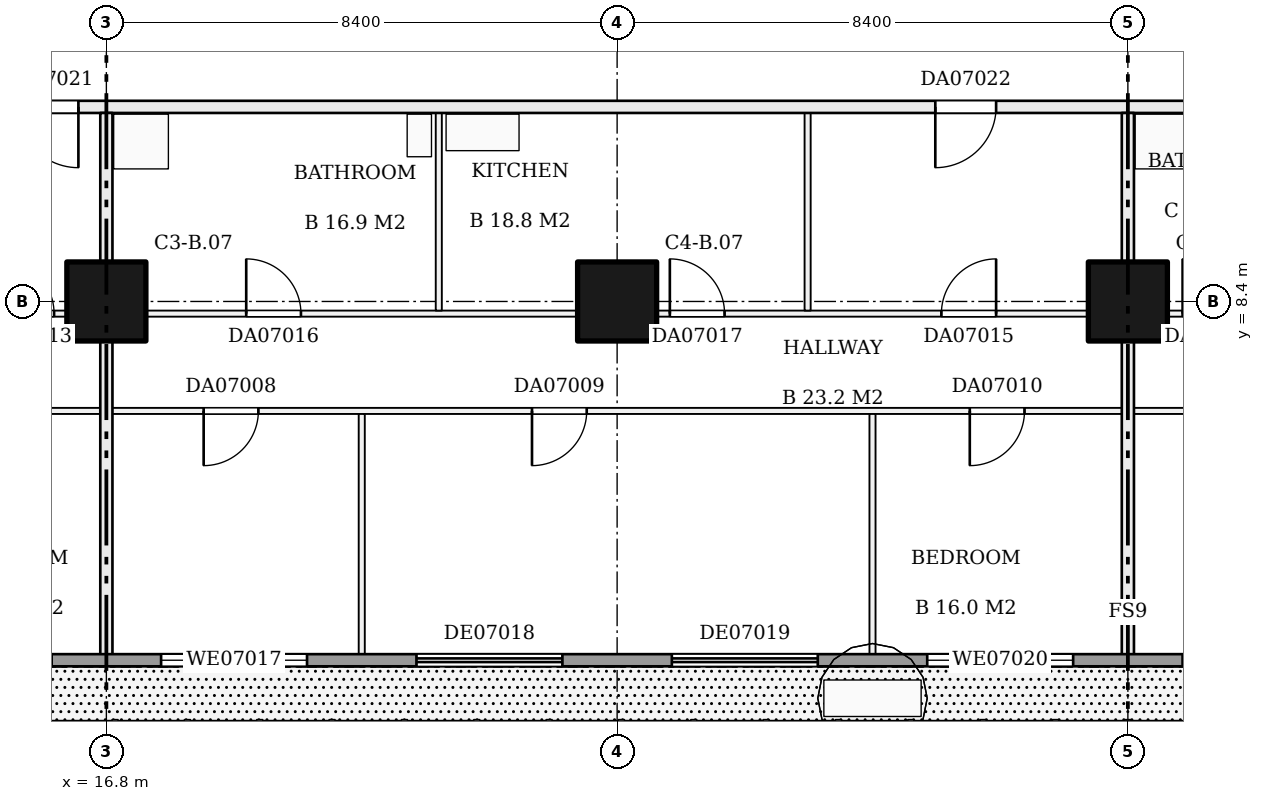
"""IFC4 building model, lengths in metres.
Left out: names, types, materials, properties, quantities, classifications, styles, units other than length and angle.
Written with IfcOpenShell. Run it as: python <this file> out.ifc"""

import sys

from ifc_helpers import new_model, si_unit, direction, frame, frame_2d, origin, origin_2d, place, context, subcontext, project, spatial, rectangle, extrude, element, fill, save


model = new_model("IFC4")
c1 = context("Model", 3, precision=1e-05, world=origin(), true_north=direction((0.0, 1.0)))
c2 = subcontext(c1, "Body", "Model", "MODEL_VIEW")
j1 = project(units=[si_unit("LENGTHUNIT", "METRE"), si_unit("PLANEANGLEUNIT", "RADIAN")], contexts=[c1])
p1 = place(None, origin())
s1 = spatial("IfcSite", under=j1, at=p1, CompositionType="ELEMENT")
p2 = place(p1, origin())
s2 = spatial("IfcBuilding", under=s1, at=p2, CompositionType="ELEMENT")
p3 = place(p2, frame((0.0, 0.0, 35.7)))
s3 = spatial("IfcBuildingStorey", under=s2, at=p3, CompositionType="ELEMENT", Elevation=35.7)
for number, where, z_axis, x_axis in (
    (1, (16.8, 8.4, 0.0), (0.0, 0.0, 1.0), (1.0, 0.0, 0.0)),
    (2, (25.2, 8.4, 0.0), (0.0, 0.0, 1.0), (1.0, 0.0, 0.0)),
    (3, (33.6, 8.4, 0.0), (0.0, 0.0, 1.0), (1.0, 0.0, 0.0)),
):
    element("IfcColumn", number, at=place(p3, frame(where, z_axis=z_axis, x_axis=x_axis)), inside=s3, PredefinedType="COLUMN", context=c2, shape_type="SweptSolid", body=[
        extrude(rectangle(XDim=1.3, YDim=1.3, at=origin_2d()), origin(), (0.0, 0.0, 1.0), 3.22),
    ])
p4 = place(p3, frame((12.65, 6.6, 0.0), z_axis=(0.0, 0.0, 1.0), x_axis=(1.0, 0.0, 0.0)))
e4 = element("IfcWall", 4, at=p4, inside=s3, PredefinedType="PARTITIONING", context=c2, shape_type="SweptSolid", body=[
    extrude(rectangle(XDim=29.25, YDim=0.1, at=frame_2d((14.625, 0.0))), origin(), (0.0, 0.0, 1.0), 3.22),
])
p5 = place(p4, frame((1.65, 0.0, 0.0)))
e5 = element("IfcOpeningElement", 5, at=p5, cuts=e4, PredefinedType="OPENING", context=c2, shape_type="SweptSolid", body=[
    extrude(rectangle(XDim=0.9, YDim=2.1, at=frame_2d((0.45, 1.05))), frame((0.0, 0.06, 0.0), z_axis=(0.0, -1.0, 0.0), x_axis=(1.0, 0.0, 0.0)), (0.0, 0.0, 1.0), 0.12),
])
p6 = place(p4, frame((5.75, 0.0, 0.0)))
e6 = element("IfcOpeningElement", 6, at=p6, cuts=e4, PredefinedType="OPENING", context=c2, shape_type="SweptSolid", body=[
    extrude(rectangle(XDim=0.9, YDim=2.1, at=frame_2d((0.45, 1.05))), frame((0.0, 0.06, 0.0), z_axis=(0.0, -1.0, 0.0), x_axis=(1.0, 0.0, 0.0)), (0.0, 0.0, 1.0), 0.12),
])
p7 = place(p4, frame((11.15, 0.0, 0.0)))
e7 = element("IfcOpeningElement", 7, at=p7, cuts=e4, PredefinedType="OPENING", context=c2, shape_type="SweptSolid", body=[
    extrude(rectangle(XDim=0.9, YDim=2.1, at=frame_2d((0.45, 1.05))), frame((0.0, 0.06, 0.0), z_axis=(0.0, -1.0, 0.0), x_axis=(1.0, 0.0, 0.0)), (0.0, 0.0, 1.0), 0.12),
])
p8 = place(p4, frame((18.35, 0.0, 0.0)))
e8 = element("IfcOpeningElement", 8, at=p8, cuts=e4, PredefinedType="OPENING", context=c2, shape_type="SweptSolid", body=[
    extrude(rectangle(XDim=0.9, YDim=2.1, at=frame_2d((0.45, 1.05))), frame((0.0, 0.06, 0.0), z_axis=(0.0, -1.0, 0.0), x_axis=(1.0, 0.0, 0.0)), (0.0, 0.0, 1.0), 0.12),
])
p9 = place(p4, frame((22.55, 0.0, 0.0)))
e9 = element("IfcOpeningElement", 9, at=p9, cuts=e4, PredefinedType="OPENING", context=c2, shape_type="SweptSolid", body=[
    extrude(rectangle(XDim=0.9, YDim=2.1, at=frame_2d((0.45, 1.05))), frame((0.0, 0.06, 0.0), z_axis=(0.0, -1.0, 0.0), x_axis=(1.0, 0.0, 0.0)), (0.0, 0.0, 1.0), 0.12),
])
p10 = place(p4, frame((26.75, 0.0, 0.0)))
e10 = element("IfcOpeningElement", 10, at=p10, cuts=e4, PredefinedType="OPENING", context=c2, shape_type="SweptSolid", body=[
    extrude(rectangle(XDim=0.9, YDim=2.1, at=frame_2d((0.45, 1.05))), frame((0.0, 0.06, 0.0), z_axis=(0.0, -1.0, 0.0), x_axis=(1.0, 0.0, 0.0)), (0.0, 0.0, 1.0), 0.12),
])
p11 = place(p3, frame((12.65, 8.2, 0.0), z_axis=(0.0, 0.0, 1.0), x_axis=(1.0, 0.0, 0.0)))
e11 = element("IfcWall", 11, at=p11, inside=s3, PredefinedType="PARTITIONING", context=c2, shape_type="SweptSolid", body=[
    extrude(rectangle(XDim=29.25, YDim=0.1, at=frame_2d((14.625, 0.0))), origin(), (0.0, 0.0, 1.0), 3.22),
])
p12 = place(p11, frame((2.39, 0.0, 0.0)))
e12 = element("IfcOpeningElement", 12, at=p12, cuts=e11, PredefinedType="OPENING", context=c2, shape_type="SweptSolid", body=[
    extrude(rectangle(XDim=0.9, YDim=2.1, at=frame_2d((0.45, 1.05))), frame((0.0, 0.06, 0.0), z_axis=(0.0, -1.0, 0.0), x_axis=(1.0, 0.0, 0.0)), (0.0, 0.0, 1.0), 0.12),
])
p13 = place(p11, frame((0.65, 0.0, 0.0)))
e13 = element("IfcOpeningElement", 13, at=p13, cuts=e11, PredefinedType="OPENING", context=c2, shape_type="SweptSolid", body=[
    extrude(rectangle(XDim=0.9, YDim=2.1, at=frame_2d((0.45, 1.05))), frame((0.0, 0.06, 0.0), z_axis=(0.0, -1.0, 0.0), x_axis=(1.0, 0.0, 0.0)), (0.0, 0.0, 1.0), 0.12),
])
p14 = place(p11, frame((17.883, 0.0, 0.0)))
e14 = element("IfcOpeningElement", 14, at=p14, cuts=e11, PredefinedType="OPENING", context=c2, shape_type="SweptSolid", body=[
    extrude(rectangle(XDim=0.9, YDim=2.1, at=frame_2d((0.45, 1.05))), frame((0.0, 0.06, 0.0), z_axis=(0.0, -1.0, 0.0), x_axis=(1.0, 0.0, 0.0)), (0.0, 0.0, 1.0), 0.12),
])
p15 = place(p11, frame((6.45, 0.0, 0.0)))
e15 = element("IfcOpeningElement", 15, at=p15, cuts=e11, PredefinedType="OPENING", context=c2, shape_type="SweptSolid", body=[
    extrude(rectangle(XDim=0.9, YDim=2.1, at=frame_2d((0.45, 1.05))), frame((0.0, 0.06, 0.0), z_axis=(0.0, -1.0, 0.0), x_axis=(1.0, 0.0, 0.0)), (0.0, 0.0, 1.0), 0.12),
])
p16 = place(p11, frame((13.417, 0.0, 0.0)))
e16 = element("IfcOpeningElement", 16, at=p16, cuts=e11, PredefinedType="OPENING", context=c2, shape_type="SweptSolid", body=[
    extrude(rectangle(XDim=0.9, YDim=2.1, at=frame_2d((0.45, 1.05))), frame((0.0, 0.06, 0.0), z_axis=(0.0, -1.0, 0.0), x_axis=(1.0, 0.0, 0.0)), (0.0, 0.0, 1.0), 0.12),
])
p17 = place(p11, frame((27.683, 0.0, 0.0)))
e17 = element("IfcOpeningElement", 17, at=p17, cuts=e11, PredefinedType="OPENING", context=c2, shape_type="SweptSolid", body=[
    extrude(rectangle(XDim=0.9, YDim=2.1, at=frame_2d((0.45, 1.05))), frame((0.0, 0.06, 0.0), z_axis=(0.0, -1.0, 0.0), x_axis=(1.0, 0.0, 0.0)), (0.0, 0.0, 1.0), 0.12),
])
p18 = place(p11, frame((21.85, 0.0, 0.0)))
e18 = element("IfcOpeningElement", 18, at=p18, cuts=e11, PredefinedType="OPENING", context=c2, shape_type="SweptSolid", body=[
    extrude(rectangle(XDim=0.9, YDim=2.1, at=frame_2d((0.45, 1.05))), frame((0.0, 0.06, 0.0), z_axis=(0.0, -1.0, 0.0), x_axis=(1.0, 0.0, 0.0)), (0.0, 0.0, 1.0), 0.12),
])
p19 = place(p11, frame((24.817, 0.0, 0.0)))
e19 = element("IfcOpeningElement", 19, at=p19, cuts=e11, PredefinedType="OPENING", context=c2, shape_type="SweptSolid", body=[
    extrude(rectangle(XDim=0.9, YDim=2.1, at=frame_2d((0.45, 1.05))), frame((0.0, 0.06, 0.0), z_axis=(0.0, -1.0, 0.0), x_axis=(1.0, 0.0, 0.0)), (0.0, 0.0, 1.0), 0.12),
])
p20 = place(p3, frame((11.5, 11.6, 0.0), z_axis=(0.0, 0.0, 1.0), x_axis=(1.0, 0.0, 0.0)))
e20 = element("IfcWall", 20, at=p20, inside=s3, PredefinedType="PARTITIONING", context=c2, shape_type="SweptSolid", body=[
    extrude(rectangle(XDim=30.5, YDim=0.2, at=frame_2d((15.25, 0.0))), origin(), (0.0, 0.0, 1.0), 3.22),
])
p21 = place(p20, frame((3.84, 0.0, 0.0)))
e21 = element("IfcOpeningElement", 21, at=p21, cuts=e20, PredefinedType="OPENING", context=c2, shape_type="SweptSolid", body=[
    extrude(rectangle(XDim=1.0, YDim=2.1, at=frame_2d((0.5, 1.05))), frame((0.0, 0.11, 0.0), z_axis=(0.0, -1.0, 0.0), x_axis=(1.0, 0.0, 0.0)), (0.0, 0.0, 1.0), 0.22),
])
p22 = place(p20, frame((18.933, 0.0, 0.0)))
e22 = element("IfcOpeningElement", 22, at=p22, cuts=e20, PredefinedType="OPENING", context=c2, shape_type="SweptSolid", body=[
    extrude(rectangle(XDim=1.0, YDim=2.1, at=frame_2d((0.5, 1.05))), frame((0.0, 0.11, 0.0), z_axis=(0.0, -1.0, 0.0), x_axis=(1.0, 0.0, 0.0)), (0.0, 0.0, 1.0), 0.22),
])
p23 = place(p20, frame((28.733, 0.0, 0.0)))
e23 = element("IfcOpeningElement", 23, at=p23, cuts=e20, PredefinedType="OPENING", context=c2, shape_type="SweptSolid", body=[
    extrude(rectangle(XDim=1.0, YDim=2.1, at=frame_2d((0.5, 1.05))), frame((0.0, 0.11, 0.0), z_axis=(0.0, -1.0, 0.0), x_axis=(1.0, 0.0, 0.0)), (0.0, 0.0, 1.0), 0.22),
])
p24 = place(p3, frame((16.8, 2.5, 0.0), z_axis=(0.0, 0.0, 1.0), x_axis=(0.0, 1.0, 0.0)))
e24 = element("IfcWall", 24, at=p24, inside=s3, PredefinedType="PARTITIONING", context=c2, shape_type="SweptSolid", body=[
    extrude(rectangle(XDim=9.0, YDim=0.2, at=frame_2d((4.5, 0.0))), origin(), (0.0, 0.0, 1.0), 3.22),
])
p25 = place(p3, frame((21.0, 2.5, 0.0), z_axis=(0.0, 0.0, 1.0), x_axis=(0.0, 1.0, 0.0)))
e25 = element("IfcWall", 25, at=p25, inside=s3, PredefinedType="PARTITIONING", context=c2, shape_type="SweptSolid", body=[
    extrude(rectangle(XDim=4.05, YDim=0.1, at=frame_2d((2.025, 0.0))), origin(), (0.0, 0.0, 1.0), 3.22),
])
for number, where, z_axis, x_axis in (
    (26, (22.267, 8.25, 0.0), (0.0, 0.0, 1.0), (0.0, 1.0, 0.0)),
    (27, (28.333, 8.25, 0.0), (0.0, 0.0, 1.0), (0.0, 1.0, 0.0)),
):
    element("IfcWall", number, at=place(p3, frame(where, z_axis=z_axis, x_axis=x_axis)), inside=s3, PredefinedType="PARTITIONING", context=c2, shape_type="SweptSolid", body=[
        extrude(rectangle(XDim=3.25, YDim=0.1, at=frame_2d((1.625, 0.0))), origin(), (0.0, 0.0, 1.0), 3.22),
    ])
p26 = place(p3, frame((29.4, 2.5, 0.0), z_axis=(0.0, 0.0, 1.0), x_axis=(0.0, 1.0, 0.0)))
e28 = element("IfcWall", 28, at=p26, inside=s3, PredefinedType="PARTITIONING", context=c2, shape_type="SweptSolid", body=[
    extrude(rectangle(XDim=4.05, YDim=0.1, at=frame_2d((2.025, 0.0))), origin(), (0.0, 0.0, 1.0), 3.22),
])
p27 = place(p3, frame((33.6, 2.5, 0.0), z_axis=(0.0, 0.0, 1.0), x_axis=(0.0, 1.0, 0.0)))
e29 = element("IfcWall", 29, at=p27, inside=s3, PredefinedType="PARTITIONING", context=c2, shape_type="SweptSolid", body=[
    extrude(rectangle(XDim=9.0, YDim=0.2, at=frame_2d((4.5, 0.0))), origin(), (0.0, 0.0, 1.0), 3.22),
])
p28 = place(p3, frame((4.8, 2.5, 0.0), z_axis=(0.0, 0.0, 1.0), x_axis=(1.0, 0.0, 0.0)))
e30 = element("IfcWall", 30, at=p28, inside=s3, PredefinedType="SOLIDWALL", context=c2, shape_type="SweptSolid", body=[
    extrude(rectangle(XDim=57.6, YDim=0.2, at=frame_2d((28.8, 0.0))), origin(), (0.0, 0.0, 1.0), 3.22),
])
p29 = place(p28, frame((0.3, 0.0, 0.0)))
e31 = element("IfcOpeningElement", 31, at=p29, cuts=e30, PredefinedType="OPENING", context=c2, shape_type="SweptSolid", body=[
    extrude(rectangle(XDim=2.4, YDim=2.2, at=frame_2d((1.2, 1.1))), frame((0.0, 0.11, 0.0), z_axis=(0.0, -1.0, 0.0), x_axis=(1.0, 0.0, 0.0)), (0.0, 0.0, 1.0), 0.22),
])
p30 = place(p28, frame((4.5, 0.0, 0.9)))
e32 = element("IfcOpeningElement", 32, at=p30, cuts=e30, PredefinedType="OPENING", context=c2, shape_type="SweptSolid", body=[
    extrude(rectangle(XDim=2.4, YDim=1.5, at=frame_2d((1.2, 0.75))), frame((0.0, 0.11, 0.0), z_axis=(0.0, -1.0, 0.0), x_axis=(1.0, 0.0, 0.0)), (0.0, 0.0, 1.0), 0.22),
])
p31 = place(p28, frame((8.7, 0.0, 0.9)))
e33 = element("IfcOpeningElement", 33, at=p31, cuts=e30, PredefinedType="OPENING", context=c2, shape_type="SweptSolid", body=[
    extrude(rectangle(XDim=2.4, YDim=1.5, at=frame_2d((1.2, 0.75))), frame((0.0, 0.11, 0.0), z_axis=(0.0, -1.0, 0.0), x_axis=(1.0, 0.0, 0.0)), (0.0, 0.0, 1.0), 0.22),
])
p32 = place(p28, frame((12.9, 0.0, 0.9)))
e34 = element("IfcOpeningElement", 34, at=p32, cuts=e30, PredefinedType="OPENING", context=c2, shape_type="SweptSolid", body=[
    extrude(rectangle(XDim=2.4, YDim=1.5, at=frame_2d((1.2, 0.75))), frame((0.0, 0.11, 0.0), z_axis=(0.0, -1.0, 0.0), x_axis=(1.0, 0.0, 0.0)), (0.0, 0.0, 1.0), 0.22),
])
p33 = place(p28, frame((17.1, 0.0, 0.0)))
e35 = element("IfcOpeningElement", 35, at=p33, cuts=e30, PredefinedType="OPENING", context=c2, shape_type="SweptSolid", body=[
    extrude(rectangle(XDim=2.4, YDim=2.2, at=frame_2d((1.2, 1.1))), frame((0.0, 0.11, 0.0), z_axis=(0.0, -1.0, 0.0), x_axis=(1.0, 0.0, 0.0)), (0.0, 0.0, 1.0), 0.22),
])
p34 = place(p28, frame((21.3, 0.0, 0.0)))
e36 = element("IfcOpeningElement", 36, at=p34, cuts=e30, PredefinedType="OPENING", context=c2, shape_type="SweptSolid", body=[
    extrude(rectangle(XDim=2.4, YDim=2.2, at=frame_2d((1.2, 1.1))), frame((0.0, 0.11, 0.0), z_axis=(0.0, -1.0, 0.0), x_axis=(1.0, 0.0, 0.0)), (0.0, 0.0, 1.0), 0.22),
])
p35 = place(p28, frame((25.5, 0.0, 0.9)))
e37 = element("IfcOpeningElement", 37, at=p35, cuts=e30, PredefinedType="OPENING", context=c2, shape_type="SweptSolid", body=[
    extrude(rectangle(XDim=2.4, YDim=1.5, at=frame_2d((1.2, 0.75))), frame((0.0, 0.11, 0.0), z_axis=(0.0, -1.0, 0.0), x_axis=(1.0, 0.0, 0.0)), (0.0, 0.0, 1.0), 0.22),
])
p36 = place(p28, frame((29.7, 0.0, 0.0)))
e38 = element("IfcOpeningElement", 38, at=p36, cuts=e30, PredefinedType="OPENING", context=c2, shape_type="SweptSolid", body=[
    extrude(rectangle(XDim=2.4, YDim=2.2, at=frame_2d((1.2, 1.1))), frame((0.0, 0.11, 0.0), z_axis=(0.0, -1.0, 0.0), x_axis=(1.0, 0.0, 0.0)), (0.0, 0.0, 1.0), 0.22),
])
p37 = place(p28, frame((33.9, 0.0, 0.9)))
e39 = element("IfcOpeningElement", 39, at=p37, cuts=e30, PredefinedType="OPENING", context=c2, shape_type="SweptSolid", body=[
    extrude(rectangle(XDim=2.4, YDim=1.5, at=frame_2d((1.2, 0.75))), frame((0.0, 0.11, 0.0), z_axis=(0.0, -1.0, 0.0), x_axis=(1.0, 0.0, 0.0)), (0.0, 0.0, 1.0), 0.22),
])
p38 = place(p28, frame((38.1, 0.0, 0.9)))
e40 = element("IfcOpeningElement", 40, at=p38, cuts=e30, PredefinedType="OPENING", context=c2, shape_type="SweptSolid", body=[
    extrude(rectangle(XDim=2.4, YDim=1.5, at=frame_2d((1.2, 0.75))), frame((0.0, 0.11, 0.0), z_axis=(0.0, -1.0, 0.0), x_axis=(1.0, 0.0, 0.0)), (0.0, 0.0, 1.0), 0.22),
])
p39 = place(p28, frame((42.3, 0.0, 0.9)))
e41 = element("IfcOpeningElement", 41, at=p39, cuts=e30, PredefinedType="OPENING", context=c2, shape_type="SweptSolid", body=[
    extrude(rectangle(XDim=2.4, YDim=1.5, at=frame_2d((1.2, 0.75))), frame((0.0, 0.11, 0.0), z_axis=(0.0, -1.0, 0.0), x_axis=(1.0, 0.0, 0.0)), (0.0, 0.0, 1.0), 0.22),
])
p40 = place(p28, frame((46.5, 0.0, 0.0)))
e42 = element("IfcOpeningElement", 42, at=p40, cuts=e30, PredefinedType="OPENING", context=c2, shape_type="SweptSolid", body=[
    extrude(rectangle(XDim=2.4, YDim=2.2, at=frame_2d((1.2, 1.1))), frame((0.0, 0.11, 0.0), z_axis=(0.0, -1.0, 0.0), x_axis=(1.0, 0.0, 0.0)), (0.0, 0.0, 1.0), 0.22),
])
p41 = place(p28, frame((50.7, 0.0, 0.9)))
e43 = element("IfcOpeningElement", 43, at=p41, cuts=e30, PredefinedType="OPENING", context=c2, shape_type="SweptSolid", body=[
    extrude(rectangle(XDim=2.4, YDim=1.5, at=frame_2d((1.2, 0.75))), frame((0.0, 0.11, 0.0), z_axis=(0.0, -1.0, 0.0), x_axis=(1.0, 0.0, 0.0)), (0.0, 0.0, 1.0), 0.22),
])
p42 = place(p28, frame((54.9, 0.0, 0.9)))
e44 = element("IfcOpeningElement", 44, at=p42, cuts=e30, PredefinedType="OPENING", context=c2, shape_type="SweptSolid", body=[
    extrude(rectangle(XDim=2.4, YDim=1.5, at=frame_2d((1.2, 0.75))), frame((0.0, 0.11, 0.0), z_axis=(0.0, -1.0, 0.0), x_axis=(1.0, 0.0, 0.0)), (0.0, 0.0, 1.0), 0.22),
])
p43 = place(p6, frame((0.9, 0.0, 0.0), z_axis=(0.0, 0.0, 1.0), x_axis=(-1.0, 0.0, 0.0)))
e45 = element("IfcDoor", 45, at=p43, inside=s3, OperationType="SINGLE_SWING_RIGHT", PredefinedType="DOOR", context=c2, shape_type="SweptSolid", body=[
    extrude(rectangle(XDim=0.9, YDim=2.1, at=frame_2d((0.45, 1.05))), frame((0.0, 0.025, 0.0), z_axis=(0.0, -1.0, 0.0), x_axis=(1.0, 0.0, 0.0)), (0.0, 0.0, 1.0), 0.05),
])
fill(e6, e45)
p44 = place(p7, frame((0.9, 0.0, 0.0), z_axis=(0.0, 0.0, 1.0), x_axis=(-1.0, 0.0, 0.0)))
e46 = element("IfcDoor", 46, at=p44, inside=s3, OperationType="SINGLE_SWING_RIGHT", PredefinedType="DOOR", context=c2, shape_type="SweptSolid", body=[
    extrude(rectangle(XDim=0.9, YDim=2.1, at=frame_2d((0.45, 1.05))), frame((0.0, 0.025, 0.0), z_axis=(0.0, -1.0, 0.0), x_axis=(1.0, 0.0, 0.0)), (0.0, 0.0, 1.0), 0.05),
])
fill(e7, e46)
p45 = place(p8, frame((0.9, 0.0, 0.0), z_axis=(0.0, 0.0, 1.0), x_axis=(-1.0, 0.0, 0.0)))
e47 = element("IfcDoor", 47, at=p45, inside=s3, OperationType="SINGLE_SWING_RIGHT", PredefinedType="DOOR", context=c2, shape_type="SweptSolid", body=[
    extrude(rectangle(XDim=0.9, YDim=2.1, at=frame_2d((0.45, 1.05))), frame((0.0, 0.025, 0.0), z_axis=(0.0, -1.0, 0.0), x_axis=(1.0, 0.0, 0.0)), (0.0, 0.0, 1.0), 0.05),
])
fill(e8, e47)
p46 = place(p12, origin())
e48 = element("IfcDoor", 48, at=p46, inside=s3, OperationType="SINGLE_SWING_LEFT", PredefinedType="DOOR", context=c2, shape_type="SweptSolid", body=[
    extrude(rectangle(XDim=0.9, YDim=2.1, at=frame_2d((0.45, 1.05))), frame((0.0, 0.025, 0.0), z_axis=(0.0, -1.0, 0.0), x_axis=(1.0, 0.0, 0.0)), (0.0, 0.0, 1.0), 0.05),
])
fill(e12, e48)
p47 = place(p14, origin())
e49 = element("IfcDoor", 49, at=p47, inside=s3, OperationType="SINGLE_SWING_RIGHT", PredefinedType="DOOR", context=c2, shape_type="SweptSolid", body=[
    extrude(rectangle(XDim=0.9, YDim=2.1, at=frame_2d((0.45, 1.05))), frame((0.0, 0.025, 0.0), z_axis=(0.0, -1.0, 0.0), x_axis=(1.0, 0.0, 0.0)), (0.0, 0.0, 1.0), 0.05),
])
fill(e14, e49)
p48 = place(p15, origin())
e50 = element("IfcDoor", 50, at=p48, inside=s3, OperationType="SINGLE_SWING_LEFT", PredefinedType="DOOR", context=c2, shape_type="SweptSolid", body=[
    extrude(rectangle(XDim=0.9, YDim=2.1, at=frame_2d((0.45, 1.05))), frame((0.0, 0.025, 0.0), z_axis=(0.0, -1.0, 0.0), x_axis=(1.0, 0.0, 0.0)), (0.0, 0.0, 1.0), 0.05),
])
fill(e15, e50)
p49 = place(p16, origin())
e51 = element("IfcDoor", 51, at=p49, inside=s3, OperationType="SINGLE_SWING_LEFT", PredefinedType="DOOR", context=c2, shape_type="SweptSolid", body=[
    extrude(rectangle(XDim=0.9, YDim=2.1, at=frame_2d((0.45, 1.05))), frame((0.0, 0.025, 0.0), z_axis=(0.0, -1.0, 0.0), x_axis=(1.0, 0.0, 0.0)), (0.0, 0.0, 1.0), 0.05),
])
fill(e16, e51)
p50 = place(p21, frame((1.0, 0.0, 0.0), z_axis=(0.0, 0.0, 1.0), x_axis=(-1.0, 0.0, 0.0)))
e52 = element("IfcDoor", 52, at=p50, inside=s3, OperationType="SINGLE_SWING_LEFT", PredefinedType="DOOR", context=c2, shape_type="SweptSolid", body=[
    extrude(rectangle(XDim=1.0, YDim=2.1, at=frame_2d((0.5, 1.05))), frame((0.0, 0.025, 0.0), z_axis=(0.0, -1.0, 0.0), x_axis=(1.0, 0.0, 0.0)), (0.0, 0.0, 1.0), 0.05),
])
fill(e21, e52)
p51 = place(p22, frame((1.0, 0.0, 0.0), z_axis=(0.0, 0.0, 1.0), x_axis=(-1.0, 0.0, 0.0)))
e53 = element("IfcDoor", 53, at=p51, inside=s3, OperationType="SINGLE_SWING_RIGHT", PredefinedType="DOOR", context=c2, shape_type="SweptSolid", body=[
    extrude(rectangle(XDim=1.0, YDim=2.1, at=frame_2d((0.5, 1.05))), frame((0.0, 0.025, 0.0), z_axis=(0.0, -1.0, 0.0), x_axis=(1.0, 0.0, 0.0)), (0.0, 0.0, 1.0), 0.05),
])
fill(e22, e53)
p52 = place(p32, origin())
e54 = element("IfcWindow", 54, at=p52, inside=s3, PartitioningType="SINGLE_PANEL", PredefinedType="WINDOW", context=c2, shape_type="SweptSolid", body=[
    extrude(rectangle(XDim=2.4, YDim=1.5, at=frame_2d((1.2, 0.75))), frame((0.0, 0.03, 0.0), z_axis=(0.0, -1.0, 0.0), x_axis=(1.0, 0.0, 0.0)), (0.0, 0.0, 1.0), 0.06),
])
fill(e34, e54)
p53 = place(p33, origin())
e55 = element("IfcDoor", 55, at=p53, inside=s3, OperationType="DOUBLE_DOOR_SLIDING", PredefinedType="DOOR", context=c2, shape_type="SweptSolid", body=[
    extrude(rectangle(XDim=2.4, YDim=2.2, at=frame_2d((1.2, 1.1))), frame((0.0, 0.025, 0.0), z_axis=(0.0, -1.0, 0.0), x_axis=(1.0, 0.0, 0.0)), (0.0, 0.0, 1.0), 0.05),
])
fill(e35, e55)
p54 = place(p34, origin())
e56 = element("IfcDoor", 56, at=p54, inside=s3, OperationType="DOUBLE_DOOR_SLIDING", PredefinedType="DOOR", context=c2, shape_type="SweptSolid", body=[
    extrude(rectangle(XDim=2.4, YDim=2.2, at=frame_2d((1.2, 1.1))), frame((0.0, 0.025, 0.0), z_axis=(0.0, -1.0, 0.0), x_axis=(1.0, 0.0, 0.0)), (0.0, 0.0, 1.0), 0.05),
])
fill(e36, e56)
p55 = place(p35, origin())
e57 = element("IfcWindow", 57, at=p55, inside=s3, PartitioningType="SINGLE_PANEL", PredefinedType="WINDOW", context=c2, shape_type="SweptSolid", body=[
    extrude(rectangle(XDim=2.4, YDim=1.5, at=frame_2d((1.2, 0.75))), frame((0.0, 0.03, 0.0), z_axis=(0.0, -1.0, 0.0), x_axis=(1.0, 0.0, 0.0)), (0.0, 0.0, 1.0), 0.06),
])
fill(e37, e57)
save(model, sys.argv[1])
